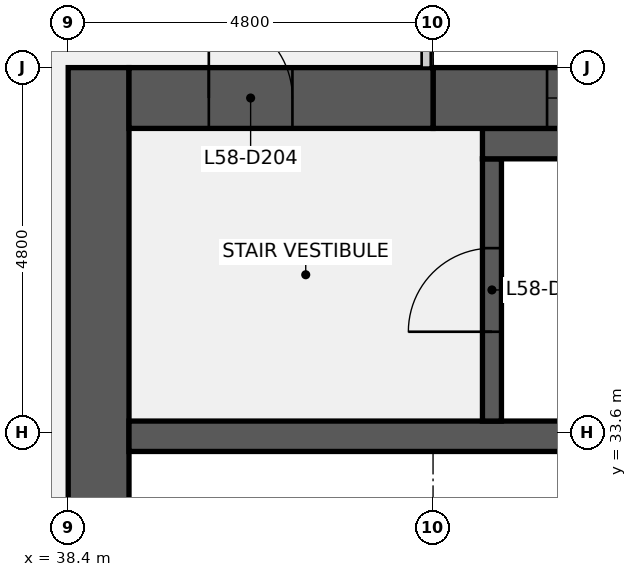
"""IFC4 building model, lengths in metres.
Left out: names, types, materials, properties, quantities, classifications, styles, units other than length and angle.
Written with IfcOpenShell. Run it as: python <this file> out.ifc"""

import sys

from ifc_helpers import new_model, si_unit, direction, frame, frame_2d, origin, place, context, subcontext, project, spatial, rectangle, extrude, element, fill, save


model = new_model("IFC4")
c1 = context("Model", 3, precision=1e-05, world=origin(), true_north=direction((0.0, 1.0)))
c2 = subcontext(c1, "Body", "Model", "MODEL_VIEW")
j1 = project(units=[si_unit("LENGTHUNIT", "METRE"), si_unit("PLANEANGLEUNIT", "RADIAN")], contexts=[c1])
p1 = place(None, origin())
s1 = spatial("IfcSite", under=j1, at=p1, CompositionType="ELEMENT")
p2 = place(p1, origin())
s2 = spatial("IfcBuilding", under=s1, at=p2, CompositionType="ELEMENT")
p3 = place(p2, frame((0.0, 0.0, 261.2)))
s3 = spatial("IfcBuildingStorey", under=s2, at=p3, CompositionType="ELEMENT", Elevation=261.2)
p4 = place(p3, frame((38.8, 9.6, 0.0), z_axis=(0.0, 0.0, 1.0), x_axis=(0.0, 1.0, 0.0)))
e1 = element("IfcWall", 1, at=p4, inside=s3, PredefinedType="SHEAR", context=c2, shape_type="SweptSolid", body=[
    extrude(rectangle(XDim=28.8, YDim=0.8, at=frame_2d((14.4, 0.0))), origin(), (0.0, 0.0, 1.0), 3.7),
])
p5 = place(p4, frame((8.7, 0.0, 0.0)))
e2 = element("IfcOpeningElement", 2, at=p5, cuts=e1, PredefinedType="OPENING", context=c2, shape_type="SweptSolid", body=[
    extrude(rectangle(XDim=1.8, YDim=2.1, at=frame_2d((0.9, 1.05))), frame((0.0, 0.41, 0.0), z_axis=(0.0, -1.0, 0.0), x_axis=(1.0, 0.0, 0.0)), (0.0, 0.0, 1.0), 0.82),
])
p6 = place(p4, frame((18.3, 0.0, 0.0)))
e3 = element("IfcOpeningElement", 3, at=p6, cuts=e1, PredefinedType="OPENING", context=c2, shape_type="SweptSolid", body=[
    extrude(rectangle(XDim=1.8, YDim=2.1, at=frame_2d((0.9, 1.05))), frame((0.0, 0.41, 0.0), z_axis=(0.0, -1.0, 0.0), x_axis=(1.0, 0.0, 0.0)), (0.0, 0.0, 1.0), 0.82),
])
p7 = place(p3, frame((39.2, 33.55, 0.0), z_axis=(0.0, 0.0, 1.0), x_axis=(1.0, 0.0, 0.0)))
e4 = element("IfcWall", 4, at=p7, inside=s3, PredefinedType="SHEAR", context=c2, shape_type="SweptSolid", body=[
    extrude(rectangle(XDim=17.6, YDim=0.4, at=frame_2d((8.8, 0.0))), origin(), (0.0, 0.0, 1.0), 3.7),
])
p8 = place(p3, frame((43.975, 33.75, 0.0), z_axis=(0.0, 0.0, 1.0), x_axis=(0.0, 1.0, 0.0)))
e5 = element("IfcWall", 5, at=p8, inside=s3, PredefinedType="SHEAR", context=c2, shape_type="SweptSolid", body=[
    extrude(rectangle(XDim=3.45, YDim=0.25, at=frame_2d((1.725, 0.0))), origin(), (0.0, 0.0, 1.0), 3.7),
])
p9 = place(p8, frame((1.175, 0.0, 0.0)))
e6 = element("IfcOpeningElement", 6, at=p9, cuts=e5, PredefinedType="OPENING", context=c2, shape_type="SweptSolid", body=[
    extrude(rectangle(XDim=1.1, YDim=2.1, at=frame_2d((0.55, 1.05))), frame((0.0, 0.135, 0.0), z_axis=(0.0, -1.0, 0.0), x_axis=(1.0, 0.0, 0.0)), (0.0, 0.0, 1.0), 0.27),
])
p10 = place(p3, frame((43.85, 37.4, 0.0), z_axis=(0.0, 0.0, 1.0), x_axis=(1.0, 0.0, 0.0)))
e7 = element("IfcWall", 7, at=p10, inside=s3, PredefinedType="SHEAR", context=c2, shape_type="SweptSolid", body=[
    extrude(rectangle(XDim=7.5, YDim=0.4, at=frame_2d((3.75, 0.0))), origin(), (0.0, 0.0, 1.0), 3.7),
])
p11 = place(p3, frame((43.2, 38.0, 0.0), z_axis=(0.0, 0.0, 1.0), x_axis=(1.0, 0.0, 0.0)))
e8 = element("IfcWall", 8, at=p11, inside=s3, PredefinedType="SHEAR", context=c2, shape_type="SweptSolid", body=[
    extrude(rectangle(XDim=13.6, YDim=0.8, at=frame_2d((6.8, 0.0))), origin(), (0.0, 0.0, 1.0), 3.7),
])
p12 = place(p11, frame((6.3, 0.0, 0.9)))
e9 = element("IfcOpeningElement", 9, at=p12, cuts=e8, PredefinedType="OPENING", context=c2, shape_type="SweptSolid", body=[
    extrude(rectangle(XDim=1.8, YDim=1.5, at=frame_2d((0.9, 0.75))), frame((0.0, 0.41, 0.0), z_axis=(0.0, -1.0, 0.0), x_axis=(1.0, 0.0, 0.0)), (0.0, 0.0, 1.0), 0.82),
])
p13 = place(p11, frame((1.5, 0.0, 0.9)))
e10 = element("IfcOpeningElement", 10, at=p13, cuts=e8, PredefinedType="OPENING", context=c2, shape_type="SweptSolid", body=[
    extrude(rectangle(XDim=1.8, YDim=1.5, at=frame_2d((0.9, 0.75))), frame((0.0, 0.41, 0.0), z_axis=(0.0, -1.0, 0.0), x_axis=(1.0, 0.0, 0.0)), (0.0, 0.0, 1.0), 0.82),
])
p14 = place(p3, frame((39.2, 38.0, 0.0), z_axis=(0.0, 0.0, 1.0), x_axis=(1.0, 0.0, 0.0)))
e11 = element("IfcWall", 11, at=p14, inside=s3, PredefinedType="SHEAR", context=c2, shape_type="SweptSolid", body=[
    extrude(rectangle(XDim=4.0, YDim=0.8, at=frame_2d((2.0, 0.0))), origin(), (0.0, 0.0, 1.0), 3.7),
])
p15 = place(p14, frame((1.05, 0.0, 0.0)))
e12 = element("IfcOpeningElement", 12, at=p15, cuts=e11, PredefinedType="OPENING", context=c2, shape_type="SweptSolid", body=[
    extrude(rectangle(XDim=1.1, YDim=2.1, at=frame_2d((0.55, 1.05))), frame((0.0, 0.41, 0.0), z_axis=(0.0, -1.0, 0.0), x_axis=(1.0, 0.0, 0.0)), (0.0, 0.0, 1.0), 0.82),
])
p16 = place(p9, origin())
e13 = element("IfcDoor", 13, at=p16, inside=s3, OperationType="SINGLE_SWING_LEFT", PredefinedType="DOOR", context=c2, shape_type="SweptSolid", body=[
    extrude(rectangle(XDim=1.1, YDim=2.1, at=frame_2d((0.55, 1.05))), frame((0.0, 0.025, 0.0), z_axis=(0.0, -1.0, 0.0), x_axis=(1.0, 0.0, 0.0)), (0.0, 0.0, 1.0), 0.05),
])
fill(e6, e13)
p17 = place(p15, origin())
e14 = element("IfcDoor", 14, at=p17, inside=s3, OperationType="SINGLE_SWING_LEFT", PredefinedType="DOOR", context=c2, shape_type="SweptSolid", body=[
    extrude(rectangle(XDim=1.1, YDim=2.1, at=frame_2d((0.55, 1.05))), frame((0.0, 0.025, 0.0), z_axis=(0.0, -1.0, 0.0), x_axis=(1.0, 0.0, 0.0)), (0.0, 0.0, 1.0), 0.05),
])
fill(e12, e14)
p18 = place(p13, origin())
e15 = element("IfcWindow", 15, at=p18, inside=s3, PartitioningType="SINGLE_PANEL", PredefinedType="WINDOW", context=c2, shape_type="SweptSolid", body=[
    extrude(rectangle(XDim=1.8, YDim=1.5, at=frame_2d((0.9, 0.75))), frame((0.0, 0.03, 0.0), z_axis=(0.0, -1.0, 0.0), x_axis=(1.0, 0.0, 0.0)), (0.0, 0.0, 1.0), 0.06),
])
fill(e10, e15)
save(model, sys.argv[1])
